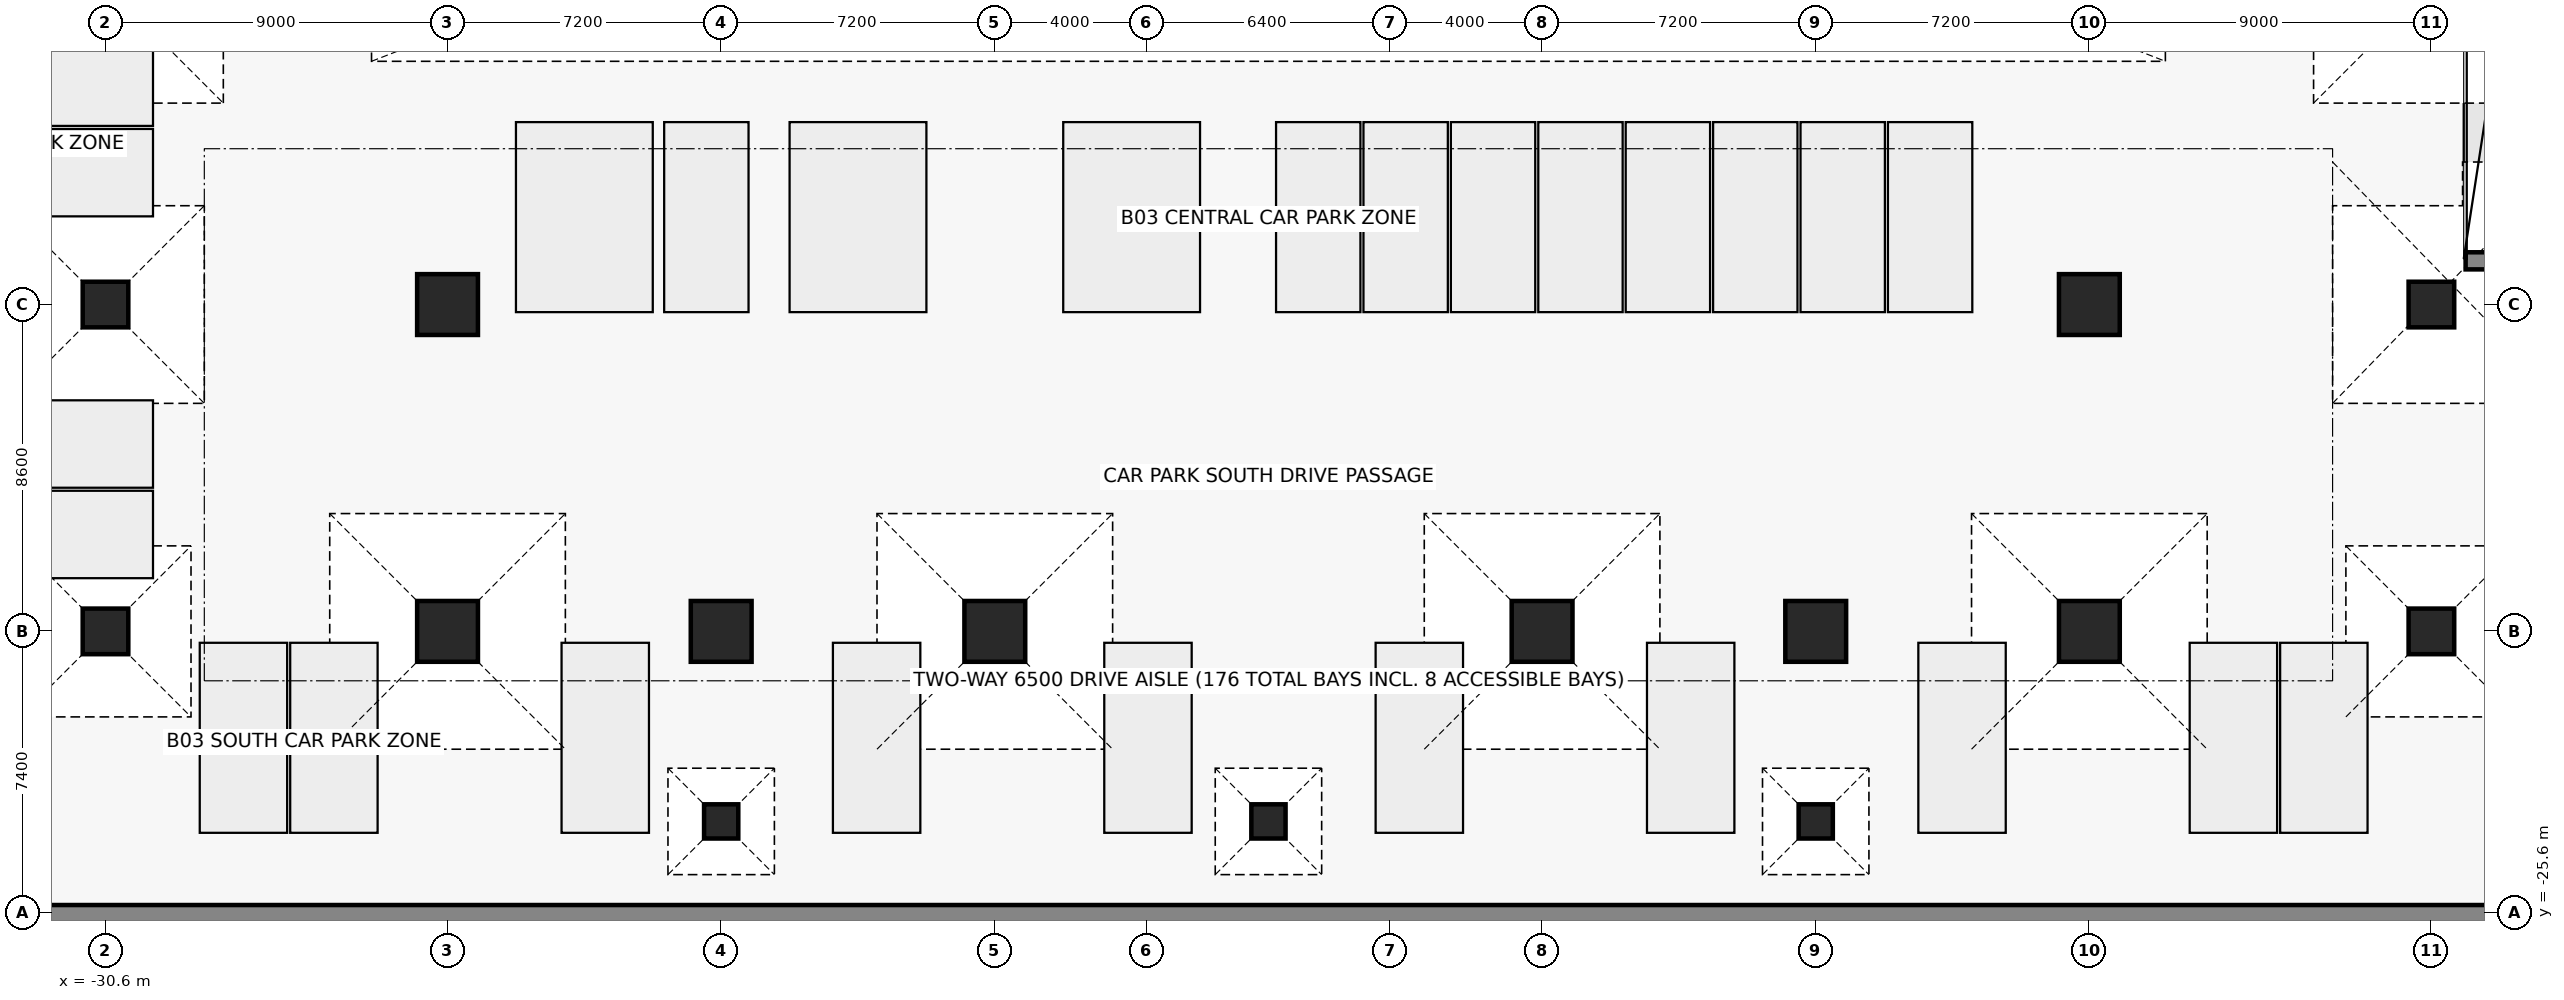
"""IFC4 building model, lengths in metres.
Left out: names, types, materials, properties, quantities, classifications, styles, units other than length and angle.
Written with IfcOpenShell. Run it as: python <this file> out.ifc"""

import sys

from ifc_helpers import new_model, si_unit, direction, frame, frame_2d, origin, origin_2d, place, context, subcontext, project, spatial, rectangle, extrude, element, save


model = new_model("IFC4")
c1 = context("Model", 3, precision=1e-05, world=origin(), true_north=direction((0.0, 1.0)))
c2 = subcontext(c1, "Body", "Model", "MODEL_VIEW")
j1 = project(units=[si_unit("LENGTHUNIT", "METRE"), si_unit("PLANEANGLEUNIT", "RADIAN")], contexts=[c1])
p1 = place(None, origin())
s1 = spatial("IfcSite", under=j1, at=p1, CompositionType="ELEMENT")
p2 = place(p1, origin())
s2 = spatial("IfcBuilding", under=s1, at=p2, CompositionType="ELEMENT")
p3 = place(p2, frame((0.0, 0.0, -13.2)))
s3 = spatial("IfcBuildingStorey", under=s2, at=p3, CompositionType="ELEMENT", Elevation=-13.2)
p4 = place(p3, frame((37.0, -25.8, 0.0), z_axis=(0.0, 0.0, 1.0), x_axis=(-1.0, 0.0, 0.0)))
e1 = element("IfcWall", 1, at=p4, inside=s3, PredefinedType="USERDEFINED", context=c2, shape_type="SweptSolid", body=[
    extrude(rectangle(XDim=74.0, YDim=0.8, at=frame_2d((37.0, 0.0))), origin(), (0.0, 0.0, 1.0), 4.12),
])
for number, where, z_axis, x_axis in (
    (2, (-21.6, -18.2, 0.0), (0.0, 0.0, 1.0), (1.0, 0.0, 0.0)),
    (3, (-14.4, -18.2, 0.0), (0.0, 0.0, 1.0), (1.0, 0.0, 0.0)),
    (4, (-7.2, -18.2, 0.0), (0.0, 0.0, 1.0), (1.0, 0.0, 0.0)),
    (5, (7.2, -18.2, 0.0), (0.0, 0.0, 1.0), (1.0, 0.0, 0.0)),
    (6, (14.4, -18.2, 0.0), (0.0, 0.0, 1.0), (1.0, 0.0, 0.0)),
    (7, (21.6, -18.2, 0.0), (0.0, 0.0, 1.0), (1.0, 0.0, 0.0)),
    (8, (-21.6, -9.6, 0.0), (0.0, 0.0, 1.0), (1.0, 0.0, 0.0)),
    (9, (21.6, -9.6, 0.0), (0.0, 0.0, 1.0), (1.0, 0.0, 0.0)),
):
    element("IfcColumn", number, at=place(p3, frame(where, z_axis=z_axis, x_axis=x_axis)), inside=s3, PredefinedType="COLUMN", context=c2, shape_type="SweptSolid", body=[
        extrude(rectangle(XDim=1.6, YDim=1.6, at=origin_2d()), origin(), (0.0, 0.0, 1.0), 4.4),
    ])
for number, where, z_axis, x_axis in (
    (10, (-30.6, -18.2, 0.0), (0.0, 0.0, 1.0), (1.0, 0.0, 0.0)),
    (11, (-30.6, -9.6, 0.0), (0.0, 0.0, 1.0), (1.0, 0.0, 0.0)),
    (12, (30.6, -18.2, 0.0), (0.0, 0.0, 1.0), (1.0, 0.0, 0.0)),
    (13, (30.6, -9.6, 0.0), (0.0, 0.0, 1.0), (1.0, 0.0, 0.0)),
):
    element("IfcColumn", number, at=place(p3, frame(where, z_axis=z_axis, x_axis=x_axis)), inside=s3, PredefinedType="COLUMN", context=c2, shape_type="SweptSolid", body=[
        extrude(rectangle(XDim=1.2, YDim=1.2, at=origin_2d()), origin(), (0.0, 0.0, 1.0), 4.4),
    ])
for number, where, z_axis, x_axis in (
    (14, (-14.4, -23.2, 0.0), (0.0, 0.0, 1.0), (1.0, 0.0, 0.0)),
    (15, (0.0, -23.2, 0.0), (0.0, 0.0, 1.0), (1.0, 0.0, 0.0)),
    (16, (14.4, -23.2, 0.0), (0.0, 0.0, 1.0), (1.0, 0.0, 0.0)),
):
    element("IfcColumn", number, at=place(p3, frame(where, z_axis=z_axis, x_axis=x_axis)), inside=s3, PredefinedType="COLUMN", context=c2, shape_type="SweptSolid", body=[
        extrude(rectangle(XDim=0.9, YDim=0.9, at=origin_2d()), origin(), (0.0, 0.0, 1.0), 4.4),
    ])
p5 = place(p3, frame((31.5, -8.45, 0.0), z_axis=(0.0, 0.0, 1.0), x_axis=(1.0, 0.0, 0.0)))
e17 = element("IfcWall", 17, at=p5, inside=s3, PredefinedType="SHEAR", context=c2, shape_type="SweptSolid", body=[
    extrude(rectangle(XDim=5.4, YDim=0.45, at=frame_2d((2.7, 0.0))), origin(), (0.0, 0.0, 1.0), 4.2),
])
save(model, sys.argv[1])
